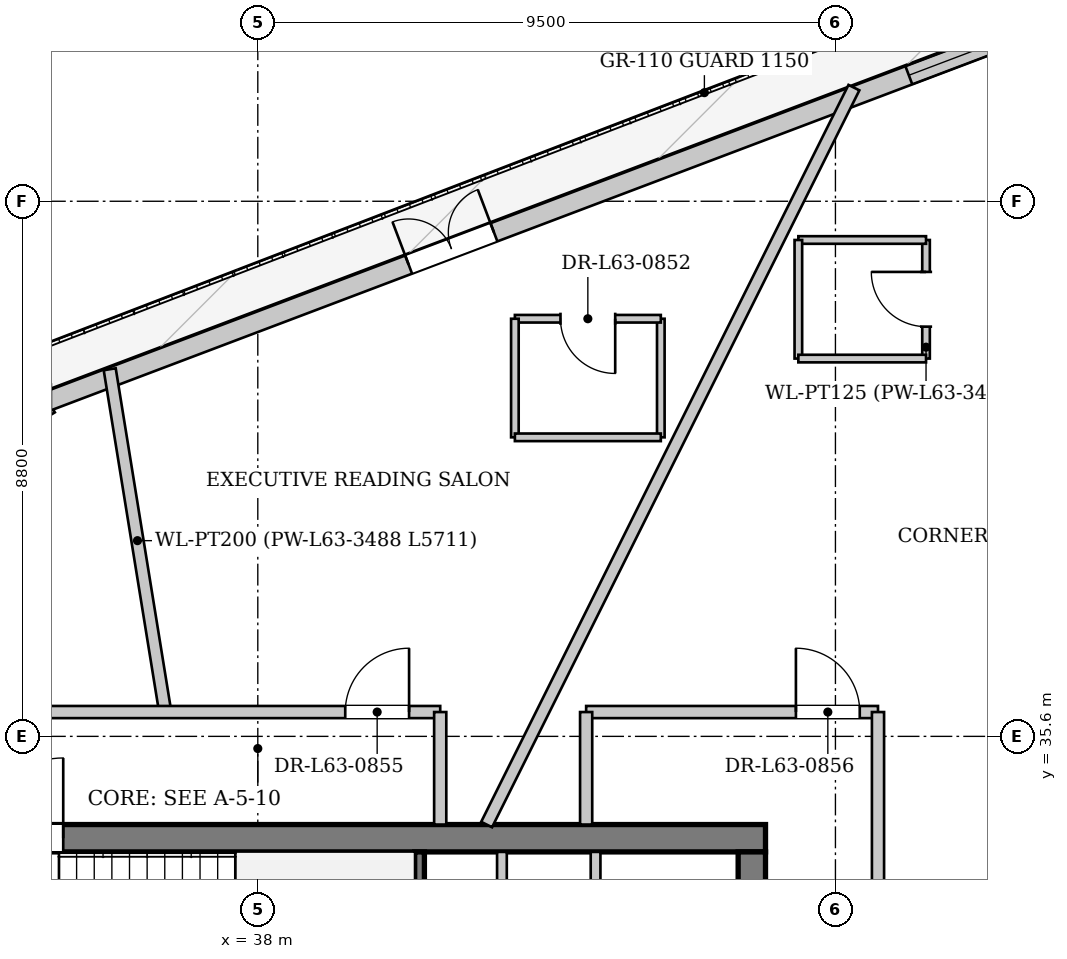
"""IFC4 building model, lengths in metres.
Left out: names, types, materials, properties, quantities, classifications, styles, units other than length and angle.
Written with IfcOpenShell. Run it as: python <this file> out.ifc"""

import sys

from ifc_helpers import new_model, si_unit, direction, frame, frame_2d, origin, origin_2d, place, context, subcontext, project, spatial, rectangle, i_section, extrude, source, transform, mapped, element, fill, save


model = new_model("IFC4")
c1 = context("Model", 3, precision=1e-05, world=origin(), true_north=direction((0.0, 1.0)))
c2 = subcontext(c1, "Body", "Model", "MODEL_VIEW")
j1 = project(units=[si_unit("LENGTHUNIT", "METRE"), si_unit("PLANEANGLEUNIT", "RADIAN")], contexts=[c1])
p1 = place(None, origin())
s1 = spatial("IfcSite", under=j1, at=p1, CompositionType="ELEMENT")
p2 = place(p1, origin())
s2 = spatial("IfcBuilding", under=s1, at=p2, CompositionType="ELEMENT")
p3 = place(p2, frame((0.0, 0.0, 238.1)))
s3 = spatial("IfcBuildingStorey", under=s2, at=p3, CompositionType="ELEMENT", Elevation=238.1)
m1 = source(origin(), c2, "Body", "SweptSolid", [
    extrude(i_section(OverallWidth=0.406, OverallDepth=0.416, WebThickness=0.027, FlangeThickness=0.042, at=origin_2d()), origin(), (0.0, 0.0, 1.0), 3.445),
])
p4 = place(p3, frame((34.465, 41.253, 0.0), z_axis=(-0.054066700831, -0.05647596404, 0.99693894364), x_axis=(0.722346539957, -0.691531254689, 0.0)))
e1 = element("IfcColumn", 1, at=p4, inside=s3, PredefinedType="COLUMN", context=c2, shape_type="MappedRepresentation", body=[
    mapped(m1, transform((0.0, 0.0, 0.0), x_axis=(1.0, 0.0, 0.0), y_axis=(0.0, 1.0, 0.0), z_axis=(0.0, 0.0, 1.0), scale=1.0)),
])
p5 = place(p3, frame((15.525, 29.57, 0.0), z_axis=(0.0, 0.0, 1.0), x_axis=(0.855554684799, 0.517712450418, 0.0)))
e2 = element("IfcWall", 2, at=p5, inside=s3, PredefinedType="SOLIDWALL", context=c2, shape_type="SweptSolid", body=[
    extrude(rectangle(XDim=22.253, YDim=0.38, at=frame_2d((11.126, 0.0))), origin(), (0.0, 0.0, 1.0), 2.872),
])
p6 = place(p5, frame((5.131, 0.0, 0.502)))
e3 = element("IfcOpeningElement", 3, at=p6, cuts=e2, PredefinedType="OPENING", context=c2, shape_type="SweptSolid", body=[
    extrude(rectangle(XDim=2.2, YDim=2.25, at=frame_2d((1.1, 1.125))), frame((0.0, 0.2, 0.0), z_axis=(0.0, -1.0, 0.0), x_axis=(1.0, 0.0, 0.0)), (0.0, 0.0, 1.0), 0.4),
])
p7 = place(p5, frame((14.922, 0.0, 0.502)))
e4 = element("IfcOpeningElement", 4, at=p7, cuts=e2, PredefinedType="OPENING", context=c2, shape_type="SweptSolid", body=[
    extrude(rectangle(XDim=2.2, YDim=2.25, at=frame_2d((1.1, 1.125))), frame((0.0, 0.2, 0.0), z_axis=(0.0, -1.0, 0.0), x_axis=(1.0, 0.0, 0.0)), (0.0, 0.0, 1.0), 0.4),
])
p8 = place(p3, frame((34.522, 41.104, 0.0), z_axis=(0.0, 0.0, 1.0), x_axis=(0.935273105542, 0.353926854095, 0.0)))
e5 = element("IfcWall", 5, at=p8, inside=s3, PredefinedType="SOLIDWALL", context=c2, shape_type="SweptSolid", body=[
    extrude(rectangle(XDim=22.253, YDim=0.32, at=frame_2d((11.126, 0.0))), origin(), (0.0, 0.0, 1.0), 2.872),
])
p9 = place(p8, frame((6.371, 0.0, 0.0)))
e6 = element("IfcOpeningElement", 6, at=p9, cuts=e5, PredefinedType="OPENING", context=c2, shape_type="SweptSolid", body=[
    extrude(rectangle(XDim=1.5, YDim=2.3, at=frame_2d((0.75, 1.15))), frame((0.0, 0.17, 0.0), z_axis=(0.0, -1.0, 0.0), x_axis=(1.0, 0.0, 0.0)), (0.0, 0.0, 1.0), 0.34),
])
p10 = place(p8, frame((15.167, 0.0, 0.402)))
e7 = element("IfcOpeningElement", 7, at=p10, cuts=e5, PredefinedType="OPENING", context=c2, shape_type="SweptSolid", body=[
    extrude(rectangle(XDim=2.6, YDim=2.35, at=frame_2d((1.3, 1.175))), frame((0.0, 0.17, 0.0), z_axis=(0.0, -1.0, 0.0), x_axis=(1.0, 0.0, 0.0)), (0.0, 0.0, 1.0), 0.34),
])
p11 = place(p3, frame((29.65, 33.925, 0.0), z_axis=(0.0, 0.0, 1.0), x_axis=(1.0, 0.0, 0.0)))
e8 = element("IfcWall", 8, at=p11, inside=s3, PredefinedType="SHEAR", context=c2, shape_type="SweptSolid", body=[
    extrude(rectangle(XDim=16.7, YDim=0.45, at=frame_2d((8.35, 0.0))), origin(), (0.0, 0.0, 1.0), 3.38),
])
p12 = place(p11, frame((1.45, 0.0, 0.0)))
e9 = element("IfcOpeningElement", 9, at=p12, cuts=e8, PredefinedType="OPENING", context=c2, shape_type="SweptSolid", body=[
    extrude(rectangle(XDim=0.95, YDim=2.1, at=frame_2d((0.475, 1.05))), frame((0.0, 0.235, 0.0), z_axis=(0.0, -1.0, 0.0), x_axis=(1.0, 0.0, 0.0)), (0.0, 0.0, 1.0), 0.47),
])
p13 = place(p11, frame((3.83, 0.0, 0.0)))
e10 = element("IfcOpeningElement", 10, at=p13, cuts=e8, PredefinedType="OPENING", context=c2, shape_type="SweptSolid", body=[
    extrude(rectangle(XDim=1.32, YDim=2.2, at=frame_2d((0.66, 1.1))), frame((0.0, 0.235, 0.0), z_axis=(0.0, -1.0, 0.0), x_axis=(1.0, 0.0, 0.0)), (0.0, 0.0, 1.0), 0.47),
])
p14 = place(p3, frame((46.125, 33.7, 0.0), z_axis=(0.0, 0.0, 1.0), x_axis=(0.0, -1.0, 0.0)))
e11 = element("IfcWall", 11, at=p14, inside=s3, PredefinedType="SHEAR", context=c2, shape_type="SweptSolid", body=[
    extrude(rectangle(XDim=14.2, YDim=0.45, at=frame_2d((7.1, 0.0))), origin(), (0.0, 0.0, 1.0), 3.38),
])
p15 = place(p14, frame((5.18, 0.0, 0.0)))
e12 = element("IfcOpeningElement", 12, at=p15, cuts=e11, PredefinedType="OPENING", context=c2, shape_type="SweptSolid", body=[
    extrude(rectangle(XDim=1.6, YDim=2.2, at=frame_2d((0.8, 1.1))), frame((0.0, 0.235, 0.0), z_axis=(0.0, -1.0, 0.0), x_axis=(1.0, 0.0, 0.0)), (0.0, 0.0, 1.0), 0.47),
])
p16 = place(p14, frame((2.05, 0.0, 0.0)))
e13 = element("IfcOpeningElement", 13, at=p16, cuts=e11, PredefinedType="OPENING", context=c2, shape_type="SweptSolid", body=[
    extrude(rectangle(XDim=0.95, YDim=2.1, at=frame_2d((0.475, 1.05))), frame((0.0, 0.235, 0.0), z_axis=(0.0, -1.0, 0.0), x_axis=(1.0, 0.0, 0.0)), (0.0, 0.0, 1.0), 0.47),
])
p17 = place(p3, frame((40.66, 30.6, 0.0), z_axis=(0.0, 0.0, 1.0), x_axis=(0.0, 1.0, 0.0)))
e14 = element("IfcWall", 14, at=p17, inside=s3, PredefinedType="PARTITIONING", context=c2, shape_type="SweptSolid", body=[
    extrude(rectangle(XDim=3.1, YDim=0.16, at=frame_2d((1.55, 0.0))), origin(), (0.0, 0.0, 1.0), 3.38),
])
p18 = place(p3, frame((42.015, 30.68, 0.0), z_axis=(0.0, 0.0, 1.0), x_axis=(0.0, 1.0, 0.0)))
e15 = element("IfcWall", 15, at=p18, inside=s3, PredefinedType="PARTITIONING", context=c2, shape_type="SweptSolid", body=[
    extrude(rectangle(XDim=3.02, YDim=0.16, at=frame_2d((1.51, 0.0))), origin(), (0.0, 0.0, 1.0), 3.38),
])
p19 = place(p18, frame((0.95, 0.0, 0.0)))
e16 = element("IfcOpeningElement", 16, at=p19, cuts=e15, PredefinedType="OPENING", context=c2, shape_type="SweptSolid", body=[
    extrude(rectangle(XDim=0.95, YDim=2.1, at=frame_2d((0.475, 1.05))), frame((0.0, 0.09, 0.0), z_axis=(0.0, -1.0, 0.0), x_axis=(1.0, 0.0, 0.0)), (0.0, 0.0, 1.0), 0.18),
])
p20 = place(p3, frame((43.555, 30.68, 0.0), z_axis=(0.0, 0.0, 1.0), x_axis=(0.0, 1.0, 0.0)))
e17 = element("IfcWall", 17, at=p20, inside=s3, PredefinedType="PARTITIONING", context=c2, shape_type="SweptSolid", body=[
    extrude(rectangle(XDim=3.02, YDim=0.16, at=frame_2d((1.51, 0.0))), origin(), (0.0, 0.0, 1.0), 3.38),
])
p21 = place(p20, frame((0.95, 0.0, 0.0)))
e18 = element("IfcOpeningElement", 18, at=p21, cuts=e17, PredefinedType="OPENING", context=c2, shape_type="SweptSolid", body=[
    extrude(rectangle(XDim=0.95, YDim=2.1, at=frame_2d((0.475, 1.05))), frame((0.0, 0.09, 0.0), z_axis=(0.0, -1.0, 0.0), x_axis=(1.0, 0.0, 0.0)), (0.0, 0.0, 1.0), 0.18),
])
p22 = place(p3, frame((36.478, 36.0, 0.0), z_axis=(0.0, 0.0, 1.0), x_axis=(-0.159891020991, 0.987134672376, 0.0)))
e19 = element("IfcWall", 19, at=p22, inside=s3, PredefinedType="PARTITIONING", context=c2, shape_type="SweptSolid", body=[
    extrude(rectangle(XDim=5.711, YDim=0.2, at=frame_2d((2.855, 0.0))), origin(), (0.0, 0.0, 1.0), 3.38),
])
p23 = place(p3, frame((41.763, 34.15, 0.0), z_axis=(0.0, 0.0, 1.0), x_axis=(0.446117078005, 0.894974610094, 0.0)))
e20 = element("IfcWall", 20, at=p23, inside=s3, PredefinedType="PARTITIONING", context=c2, shape_type="SweptSolid", body=[
    extrude(rectangle(XDim=13.541, YDim=0.2, at=frame_2d((6.771, 0.0))), origin(), (0.0, 0.0, 1.0), 3.38),
])
p24 = place(p3, frame((48.99, 41.813, 0.0), z_axis=(0.0, 0.0, 1.0), x_axis=(0.0, 1.0, 0.0)))
e21 = element("IfcWall", 21, at=p24, inside=s3, PredefinedType="PARTITIONING", context=c2, shape_type="SweptSolid", body=[
    extrude(rectangle(XDim=1.95, YDim=0.125, at=frame_2d((0.975, 0.0))), origin(), (0.0, 0.0, 1.0), 3.38),
])
p25 = place(p24, frame((0.525, 0.0, 0.0)))
e22 = element("IfcOpeningElement", 22, at=p25, cuts=e21, PredefinedType="OPENING", context=c2, shape_type="SweptSolid", body=[
    extrude(rectangle(XDim=0.9, YDim=2.1, at=frame_2d((0.45, 1.05))), frame((0.0, 0.073, 0.0), z_axis=(0.0, -1.0, 0.0), x_axis=(1.0, 0.0, 0.0)), (0.0, 0.0, 1.0), 0.145),
])
p26 = place(p3, frame((48.99, 43.763, 0.0), z_axis=(0.0, 0.0, 1.0), x_axis=(-1.0, 0.0, 0.0)))
e23 = element("IfcWall", 23, at=p26, inside=s3, PredefinedType="PARTITIONING", context=c2, shape_type="SweptSolid", body=[
    extrude(rectangle(XDim=2.1, YDim=0.125, at=frame_2d((1.05, 0.0))), origin(), (0.0, 0.0, 1.0), 3.38),
])
p27 = place(p3, frame((46.89, 43.763, 0.0), z_axis=(0.0, 0.0, 1.0), x_axis=(0.0, -1.0, 0.0)))
e24 = element("IfcWall", 24, at=p27, inside=s3, PredefinedType="PARTITIONING", context=c2, shape_type="SweptSolid", body=[
    extrude(rectangle(XDim=1.95, YDim=0.125, at=frame_2d((0.975, 0.0))), origin(), (0.0, 0.0, 1.0), 3.38),
])
p28 = place(p3, frame((46.89, 41.813, 0.0), z_axis=(0.0, 0.0, 1.0), x_axis=(1.0, 0.0, 0.0)))
e25 = element("IfcWall", 25, at=p28, inside=s3, PredefinedType="PARTITIONING", context=c2, shape_type="SweptSolid", body=[
    extrude(rectangle(XDim=2.1, YDim=0.125, at=frame_2d((1.05, 0.0))), origin(), (0.0, 0.0, 1.0), 3.38),
])
p29 = place(p3, frame((44.628, 40.518, 0.0), z_axis=(0.0, 0.0, 1.0), x_axis=(0.0, 1.0, 0.0)))
e26 = element("IfcWall", 26, at=p29, inside=s3, PredefinedType="PARTITIONING", context=c2, shape_type="SweptSolid", body=[
    extrude(rectangle(XDim=1.95, YDim=0.125, at=frame_2d((0.975, 0.0))), origin(), (0.0, 0.0, 1.0), 3.38),
])
p30 = place(p3, frame((44.628, 42.468, 0.0), z_axis=(0.0, 0.0, 1.0), x_axis=(-1.0, 0.0, 0.0)))
e27 = element("IfcWall", 27, at=p30, inside=s3, PredefinedType="PARTITIONING", context=c2, shape_type="SweptSolid", body=[
    extrude(rectangle(XDim=2.4, YDim=0.125, at=frame_2d((1.2, 0.0))), origin(), (0.0, 0.0, 1.0), 3.38),
])
p31 = place(p30, frame((0.75, 0.0, 0.0)))
e28 = element("IfcOpeningElement", 28, at=p31, cuts=e27, PredefinedType="OPENING", context=c2, shape_type="SweptSolid", body=[
    extrude(rectangle(XDim=0.9, YDim=2.1, at=frame_2d((0.45, 1.05))), frame((0.0, 0.073, 0.0), z_axis=(0.0, -1.0, 0.0), x_axis=(1.0, 0.0, 0.0)), (0.0, 0.0, 1.0), 0.145),
])
p32 = place(p3, frame((42.228, 42.468, 0.0), z_axis=(0.0, 0.0, 1.0), x_axis=(0.0, -1.0, 0.0)))
e29 = element("IfcWall", 29, at=p32, inside=s3, PredefinedType="PARTITIONING", context=c2, shape_type="SweptSolid", body=[
    extrude(rectangle(XDim=1.95, YDim=0.125, at=frame_2d((0.975, 0.0))), origin(), (0.0, 0.0, 1.0), 3.38),
])
p33 = place(p3, frame((42.228, 40.518, 0.0), z_axis=(0.0, 0.0, 1.0), x_axis=(1.0, 0.0, 0.0)))
e30 = element("IfcWall", 30, at=p33, inside=s3, PredefinedType="PARTITIONING", context=c2, shape_type="SweptSolid", body=[
    extrude(rectangle(XDim=2.4, YDim=0.125, at=frame_2d((1.2, 0.0))), origin(), (0.0, 0.0, 1.0), 3.005),
])
p34 = place(p3, frame((27.8, 36.0, 0.0), z_axis=(0.0, 0.0, 1.0), x_axis=(1.0, 0.0, 0.0)))
e31 = element("IfcWall", 31, at=p34, inside=s3, PredefinedType="PARTITIONING", context=c2, shape_type="SweptSolid", body=[
    extrude(rectangle(XDim=13.2, YDim=0.2, at=frame_2d((6.6, 0.0))), origin(), (0.0, 0.0, 1.0), 3.38),
])
p35 = place(p34, frame((0.3, 0.0, 0.0)))
e32 = element("IfcOpeningElement", 32, at=p35, cuts=e31, PredefinedType="OPENING", context=c2, shape_type="SweptSolid", body=[
    extrude(rectangle(XDim=1.05, YDim=2.2, at=frame_2d((0.525, 1.1))), frame((0.0, 0.11, 0.0), z_axis=(0.0, -1.0, 0.0), x_axis=(1.0, 0.0, 0.0)), (0.0, 0.0, 1.0), 0.22),
])
p36 = place(p34, frame((11.638, 0.0, 0.0)))
e33 = element("IfcOpeningElement", 33, at=p36, cuts=e31, PredefinedType="OPENING", context=c2, shape_type="SweptSolid", body=[
    extrude(rectangle(XDim=1.05, YDim=2.2, at=frame_2d((0.525, 1.1))), frame((0.0, 0.11, 0.0), z_axis=(0.0, -1.0, 0.0), x_axis=(1.0, 0.0, 0.0)), (0.0, 0.0, 1.0), 0.22),
])
p37 = place(p3, frame((41.0, 34.15, 0.0), z_axis=(0.0, 0.0, 1.0), x_axis=(0.0, 1.0, 0.0)))
e34 = element("IfcWall", 34, at=p37, inside=s3, PredefinedType="PARTITIONING", context=c2, shape_type="SweptSolid", body=[
    extrude(rectangle(XDim=1.85, YDim=0.2, at=frame_2d((0.925, 0.0))), origin(), (0.0, 0.0, 1.0), 3.38),
])
p38 = place(p3, frame((43.4, 36.0, 0.0), z_axis=(0.0, 0.0, 1.0), x_axis=(1.0, 0.0, 0.0)))
e35 = element("IfcWall", 35, at=p38, inside=s3, PredefinedType="PARTITIONING", context=c2, shape_type="SweptSolid", body=[
    extrude(rectangle(XDim=4.8, YDim=0.2, at=frame_2d((2.4, 0.0))), origin(), (0.0, 0.0, 1.0), 3.38),
])
p39 = place(p38, frame((3.45, 0.0, 0.0)))
e36 = element("IfcOpeningElement", 36, at=p39, cuts=e35, PredefinedType="OPENING", context=c2, shape_type="SweptSolid", body=[
    extrude(rectangle(XDim=1.05, YDim=2.2, at=frame_2d((0.525, 1.1))), frame((0.0, 0.11, 0.0), z_axis=(0.0, -1.0, 0.0), x_axis=(1.0, 0.0, 0.0)), (0.0, 0.0, 1.0), 0.22),
])
p40 = place(p3, frame((43.4, 34.15, 0.0), z_axis=(0.0, 0.0, 1.0), x_axis=(0.0, 1.0, 0.0)))
e37 = element("IfcWall", 37, at=p40, inside=s3, PredefinedType="PARTITIONING", context=c2, shape_type="SweptSolid", body=[
    extrude(rectangle(XDim=1.85, YDim=0.2, at=frame_2d((0.925, 0.0))), origin(), (0.0, 0.0, 1.0), 3.38),
])
p41 = place(p3, frame((48.2, 17.2, 0.0), z_axis=(0.0, 0.0, 1.0), x_axis=(0.0, 1.0, 0.0)))
e38 = element("IfcWall", 38, at=p41, inside=s3, PredefinedType="PARTITIONING", context=c2, shape_type="SweptSolid", body=[
    extrude(rectangle(XDim=18.8, YDim=0.2, at=frame_2d((9.4, 0.0))), origin(), (0.0, 0.0, 1.0), 3.125),
])
p42 = place(p41, frame((0.3, 0.0, 0.0)))
e39 = element("IfcOpeningElement", 39, at=p42, cuts=e38, PredefinedType="OPENING", context=c2, shape_type="SweptSolid", body=[
    extrude(rectangle(XDim=1.05, YDim=2.2, at=frame_2d((0.525, 1.1))), frame((0.0, 0.11, 0.0), z_axis=(0.0, -1.0, 0.0), x_axis=(1.0, 0.0, 0.0)), (0.0, 0.0, 1.0), 0.22),
])
m2 = source(origin(), c2, "Body", "SweptSolid", [
    extrude(rectangle(XDim=1.5, YDim=2.3, at=frame_2d((0.75, 1.15))), frame((0.0, 0.025, 0.0), z_axis=(0.0, -1.0, 0.0), x_axis=(1.0, 0.0, 0.0)), (0.0, 0.0, 1.0), 0.05),
])
p43 = place(p9, origin())
e40 = element("IfcDoor", 40, at=p43, inside=s3, OperationType="DOUBLE_DOOR_SINGLE_SWING", PredefinedType="DOOR", context=c2, shape_type="MappedRepresentation", body=[
    mapped(m2, transform((0.0, 0.0, 0.0), x_axis=(1.0, 0.0, 0.0), y_axis=(0.0, 1.0, 0.0), z_axis=(0.0, 0.0, 1.0), scale=1.0)),
])
fill(e6, e40)
m3 = source(origin(), c2, "Body", "SweptSolid", [
    extrude(rectangle(XDim=2.6, YDim=2.35, at=frame_2d((1.3, 1.175))), frame((0.0, 0.03, 0.0), z_axis=(0.0, -1.0, 0.0), x_axis=(1.0, 0.0, 0.0)), (0.0, 0.0, 1.0), 0.06),
])
p44 = place(p10, origin())
e41 = element("IfcWindow", 41, at=p44, inside=s3, PartitioningType="SINGLE_PANEL", PredefinedType="WINDOW", context=c2, shape_type="MappedRepresentation", body=[
    mapped(m3, transform((0.0, 0.0, 0.0), x_axis=(1.0, 0.0, 0.0), y_axis=(0.0, 1.0, 0.0), z_axis=(0.0, 0.0, 1.0), scale=1.0)),
])
fill(e7, e41)
m4 = source(origin(), c2, "Body", "SweptSolid", [
    extrude(rectangle(XDim=1.32, YDim=2.2, at=frame_2d((0.66, 1.1))), frame((0.0, 0.025, 0.0), z_axis=(0.0, -1.0, 0.0), x_axis=(1.0, 0.0, 0.0)), (0.0, 0.0, 1.0), 0.05),
])
p45 = place(p13, origin())
e42 = element("IfcDoor", 42, at=p45, inside=s3, OperationType="SINGLE_SWING_RIGHT", PredefinedType="DOOR", context=c2, shape_type="MappedRepresentation", body=[
    mapped(m4, transform((0.0, 0.0, 0.0), x_axis=(1.0, 0.0, 0.0), y_axis=(0.0, 1.0, 0.0), z_axis=(0.0, 0.0, 1.0), scale=1.0)),
])
fill(e10, e42)
m5 = source(origin(), c2, "Body", "SweptSolid", [
    extrude(rectangle(XDim=0.9, YDim=2.1, at=frame_2d((0.45, 1.05))), frame((0.0, 0.025, 0.0), z_axis=(0.0, -1.0, 0.0), x_axis=(1.0, 0.0, 0.0)), (0.0, 0.0, 1.0), 0.05),
])
p46 = place(p25, origin())
e43 = element("IfcDoor", 43, at=p46, inside=s3, OperationType="SINGLE_SWING_RIGHT", PredefinedType="DOOR", context=c2, shape_type="MappedRepresentation", body=[
    mapped(m5, transform((0.0, 0.0, 0.0), x_axis=(1.0, 0.0, 0.0), y_axis=(0.0, 1.0, 0.0), z_axis=(0.0, 0.0, 1.0), scale=1.0)),
])
fill(e22, e43)
p47 = place(p31, origin())
e44 = element("IfcDoor", 44, at=p47, inside=s3, OperationType="SINGLE_SWING_LEFT", PredefinedType="DOOR", context=c2, shape_type="MappedRepresentation", body=[
    mapped(m5, transform((0.0, 0.0, 0.0), x_axis=(1.0, 0.0, 0.0), y_axis=(0.0, 1.0, 0.0), z_axis=(0.0, 0.0, 1.0), scale=1.0)),
])
fill(e28, e44)
m6 = source(origin(), c2, "Body", "SweptSolid", [
    extrude(rectangle(XDim=1.05, YDim=2.2, at=frame_2d((0.525, 1.1))), frame((0.0, 0.025, 0.0), z_axis=(0.0, -1.0, 0.0), x_axis=(1.0, 0.0, 0.0)), (0.0, 0.0, 1.0), 0.05),
])
p48 = place(p36, origin())
e45 = element("IfcDoor", 45, at=p48, inside=s3, OperationType="SINGLE_SWING_RIGHT", PredefinedType="DOOR", context=c2, shape_type="MappedRepresentation", body=[
    mapped(m6, transform((0.0, 0.0, 0.0), x_axis=(1.0, 0.0, 0.0), y_axis=(0.0, 1.0, 0.0), z_axis=(0.0, 0.0, 1.0), scale=1.0)),
])
fill(e33, e45)
p49 = place(p39, origin())
e46 = element("IfcDoor", 46, at=p49, inside=s3, OperationType="SINGLE_SWING_LEFT", PredefinedType="DOOR", context=c2, shape_type="MappedRepresentation", body=[
    mapped(m6, transform((0.0, 0.0, 0.0), x_axis=(1.0, 0.0, 0.0), y_axis=(0.0, 1.0, 0.0), z_axis=(0.0, 0.0, 1.0), scale=1.0)),
])
fill(e36, e46)
save(model, sys.argv[1])
